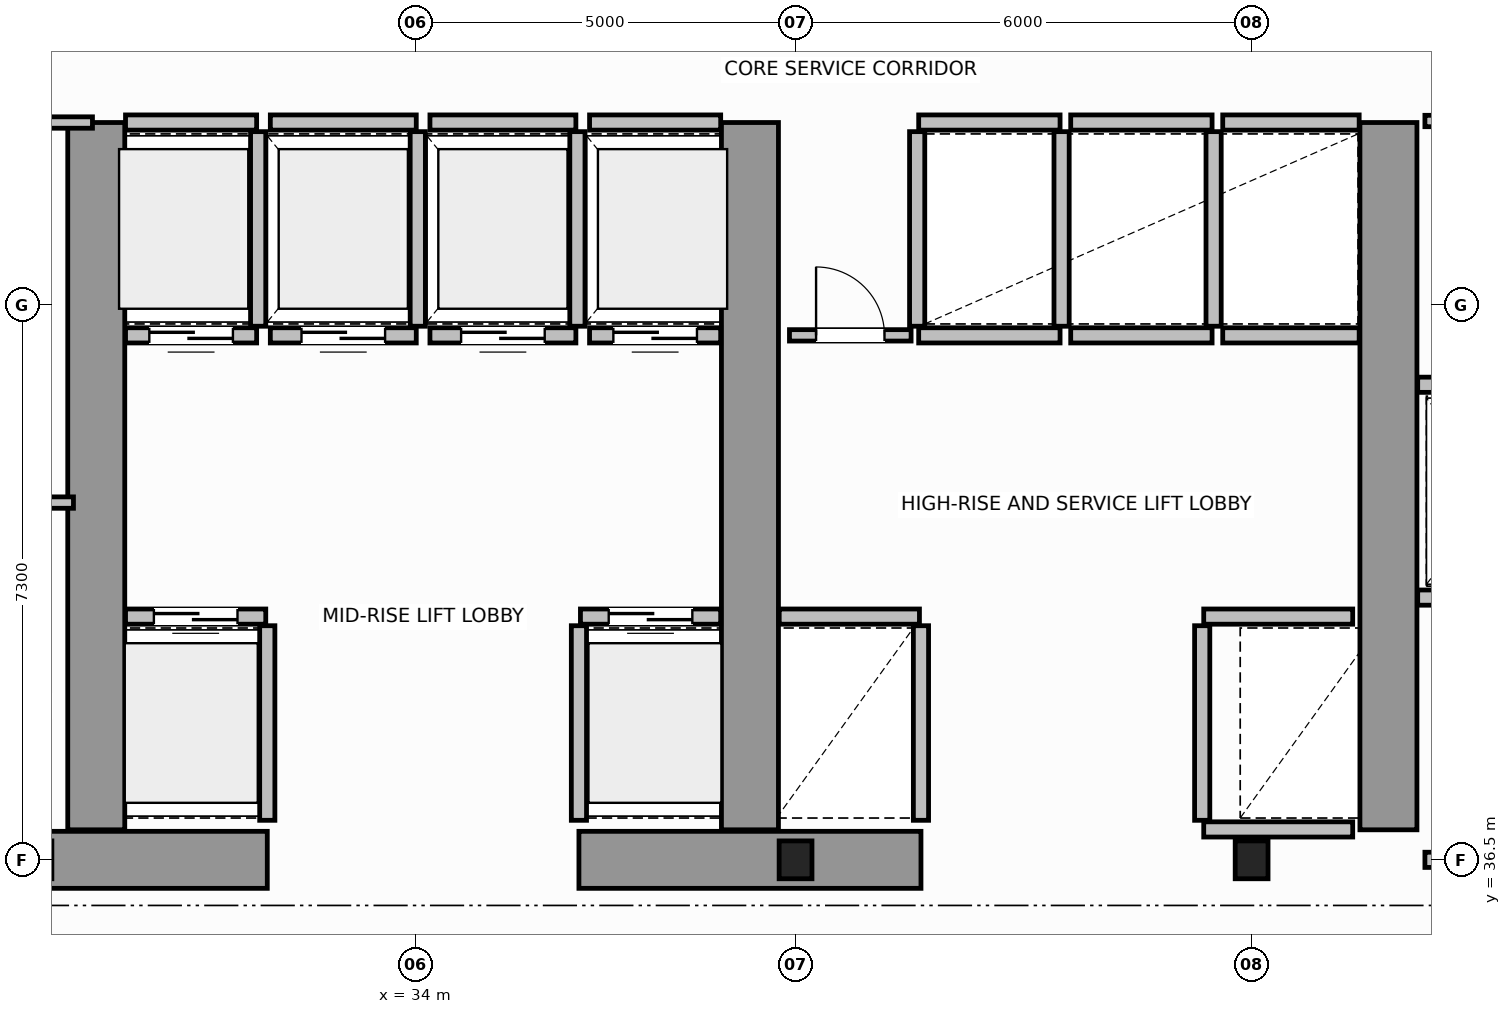
"""IFC4 building model, lengths in metres.
Left out: names, types, materials, properties, quantities, classifications, styles, units other than length and angle.
Written with IfcOpenShell. Run it as: python <this file> out.ifc"""

import sys

from ifc_helpers import new_model, si_unit, direction, frame, frame_2d, origin, origin_2d, place, context, subcontext, project, spatial, rectangle, i_section, extrude, source, transform, mapped, element, fill, save


model = new_model("IFC4")
c1 = context("Model", 3, precision=1e-05, world=origin(), true_north=direction((0.0, 1.0)))
c2 = subcontext(c1, "Body", "Model", "MODEL_VIEW")
j1 = project(units=[si_unit("LENGTHUNIT", "METRE"), si_unit("PLANEANGLEUNIT", "RADIAN")], contexts=[c1])
p1 = place(None, origin())
s1 = spatial("IfcSite", under=j1, at=p1, CompositionType="ELEMENT")
p2 = place(p1, origin())
s2 = spatial("IfcBuilding", under=s1, at=p2, CompositionType="ELEMENT")
p3 = place(p2, frame((0.0, 0.0, 161.4)))
s3 = spatial("IfcBuildingStorey", under=s2, at=p3, CompositionType="ELEMENT", Elevation=161.4)
m1 = source(origin(), c2, "Body", "SweptSolid", [
    extrude(i_section(OverallWidth=0.432, OverallDepth=0.498, WebThickness=0.055, FlangeThickness=0.068, FilletRadius=0.015, at=origin_2d()), origin(), (0.0, 0.0, 1.0), 3.8),
])
for number, where, z_axis, x_axis in (
    (1, (39.0, 36.5, 0.0), (0.0, 0.0, 1.0), (1.0, 0.0, 0.0)),
    (2, (45.0, 36.5, 0.0), (0.0, 0.0, 1.0), (1.0, 0.0, 0.0)),
):
    element("IfcColumn", number, at=place(p3, frame(where, z_axis=z_axis, x_axis=x_axis)), inside=s3, PredefinedType="COLUMN", context=c2, shape_type="MappedRepresentation", body=[
        mapped(m1, transform((0.0, 0.0, 0.0), scale=1.0)),
    ])
for number, where, z_axis, x_axis in (
    (3, (27.55, 36.5, 0.0), (0.0, 0.0, 1.0), (1.0, 0.0, 0.0)),
    (4, (36.15, 36.5, 0.0), (0.0, 0.0, 1.0), (1.0, 0.0, 0.0)),
):
    element("IfcWall", number, at=place(p3, frame(where, z_axis=z_axis, x_axis=x_axis)), inside=s3, PredefinedType="SHEAR", context=c2, shape_type="SweptSolid", body=[
        extrude(rectangle(XDim=4.5, YDim=0.75, at=frame_2d((2.25, 0.0))), origin(), (0.0, 0.0, 1.0), 3.8),
    ])
for number, where, z_axis, x_axis in (
    (5, (29.8, 36.895, 0.0), (0.0, 0.0, 1.0), (0.0, 1.0, 0.0)),
    (6, (38.4, 36.895, 0.0), (0.0, 0.0, 1.0), (0.0, 1.0, 0.0)),
    (7, (46.8, 36.895, 0.0), (0.0, 0.0, 1.0), (0.0, 1.0, 0.0)),
):
    element("IfcWall", number, at=place(p3, frame(where, z_axis=z_axis, x_axis=x_axis)), inside=s3, PredefinedType="SHEAR", context=c2, shape_type="SweptSolid", body=[
        extrude(rectangle(XDim=9.305, YDim=0.75, at=frame_2d((4.652, 0.0))), origin(), (0.0, 0.0, 1.0), 3.8),
    ])
p4 = place(p3, frame((47.28, 36.5, 0.0), z_axis=(0.0, 0.0, 1.0), x_axis=(1.0, 0.0, 0.0)))
e8 = element("IfcWall", 8, at=p4, inside=s3, PredefinedType="SOLIDWALL", context=c2, shape_type="SweptSolid", body=[
    extrude(rectangle(XDim=2.47, YDim=0.2, at=frame_2d((1.235, 0.0))), origin(), (0.0, 0.0, 1.0), 2.37),
])
p5 = place(p4, frame((0.65, 0.0, 0.0)))
e9 = element("IfcOpeningElement", 9, at=p5, cuts=e8, PredefinedType="OPENING", context=c2, shape_type="SweptSolid", body=[
    extrude(rectangle(XDim=1.1, YDim=2.15, at=frame_2d((0.55, 1.075))), frame((0.0, 0.11, 0.0), z_axis=(0.0, -1.0, 0.0), x_axis=(1.0, 0.0, 0.0)), (0.0, 0.0, 1.0), 0.22),
])
p6 = place(p3, frame((30.185, 39.7, 0.0), z_axis=(0.0, 0.0, 1.0), x_axis=(1.0, 0.0, 0.0)))
e10 = element("IfcWall", 10, at=p6, inside=s3, PredefinedType="SOLIDWALL", context=c2, shape_type="SweptSolid", body=[
    extrude(rectangle(XDim=1.845, YDim=0.2, at=frame_2d((0.922, 0.0))), origin(), (0.0, 0.0, 1.0), 3.58),
])
p7 = place(p6, frame((0.373, 0.0, 0.0)))
e11 = element("IfcOpeningElement", 11, at=p7, cuts=e10, PredefinedType="OPENING", context=c2, shape_type="SweptSolid", body=[
    extrude(rectangle(XDim=1.1, YDim=2.15, at=frame_2d((0.55, 1.075))), frame((0.0, 0.11, 0.0), z_axis=(0.0, -1.0, 0.0), x_axis=(1.0, 0.0, 0.0)), (0.0, 0.0, 1.0), 0.22),
])
p8 = place(p3, frame((32.05, 37.02, 0.0), z_axis=(0.0, 0.0, 1.0), x_axis=(0.0, 1.0, 0.0)))
e12 = element("IfcWall", 12, at=p8, inside=s3, PredefinedType="SOLIDWALL", context=c2, shape_type="SweptSolid", body=[
    extrude(rectangle(XDim=2.56, YDim=0.2, at=frame_2d((1.28, 0.0))), origin(), (0.0, 0.0, 1.0), 3.58),
])
p9 = place(p3, frame((36.17, 39.7, 0.0), z_axis=(0.0, 0.0, 1.0), x_axis=(1.0, 0.0, 0.0)))
e13 = element("IfcWall", 13, at=p9, inside=s3, PredefinedType="SOLIDWALL", context=c2, shape_type="SweptSolid", body=[
    extrude(rectangle(XDim=1.845, YDim=0.2, at=frame_2d((0.922, 0.0))), origin(), (0.0, 0.0, 1.0), 3.58),
])
p10 = place(p9, frame((0.372, 0.0, 0.0)))
e14 = element("IfcOpeningElement", 14, at=p10, cuts=e13, PredefinedType="OPENING", context=c2, shape_type="SweptSolid", body=[
    extrude(rectangle(XDim=1.1, YDim=2.15, at=frame_2d((0.55, 1.075))), frame((0.0, 0.11, 0.0), z_axis=(0.0, -1.0, 0.0), x_axis=(1.0, 0.0, 0.0)), (0.0, 0.0, 1.0), 0.22),
])
p11 = place(p3, frame((36.15, 37.02, 0.0), z_axis=(0.0, 0.0, 1.0), x_axis=(0.0, 1.0, 0.0)))
e15 = element("IfcWall", 15, at=p11, inside=s3, PredefinedType="SOLIDWALL", context=c2, shape_type="SweptSolid", body=[
    extrude(rectangle(XDim=2.56, YDim=0.2, at=frame_2d((1.28, 0.0))), origin(), (0.0, 0.0, 1.0), 3.58),
])
p12 = place(p3, frame((30.185, 43.4, 0.0), z_axis=(0.0, 0.0, 1.0), x_axis=(1.0, 0.0, 0.0)))
e16 = element("IfcWall", 16, at=p12, inside=s3, PredefinedType="SOLIDWALL", context=c2, shape_type="SweptSolid", body=[
    extrude(rectangle(XDim=1.725, YDim=0.2, at=frame_2d((0.862, 0.0))), origin(), (0.0, 0.0, 1.0), 3.58),
])
p13 = place(p12, frame((0.313, 0.0, 0.0)))
e17 = element("IfcOpeningElement", 17, at=p13, cuts=e16, PredefinedType="OPENING", context=c2, shape_type="SweptSolid", body=[
    extrude(rectangle(XDim=1.1, YDim=2.15, at=frame_2d((0.55, 1.075))), frame((0.0, 0.11, 0.0), z_axis=(0.0, -1.0, 0.0), x_axis=(1.0, 0.0, 0.0)), (0.0, 0.0, 1.0), 0.22),
])
p14 = place(p3, frame((30.185, 46.2, 0.0), z_axis=(0.0, 0.0, 1.0), x_axis=(1.0, 0.0, 0.0)))
e18 = element("IfcWall", 18, at=p14, inside=s3, PredefinedType="SOLIDWALL", context=c2, shape_type="SweptSolid", body=[
    extrude(rectangle(XDim=1.725, YDim=0.2, at=frame_2d((0.862, 0.0))), origin(), (0.0, 0.0, 1.0), 3.58),
])
p15 = place(p3, frame((31.93, 43.52, 0.0), z_axis=(0.0, 0.0, 1.0), x_axis=(0.0, 1.0, 0.0)))
e19 = element("IfcWall", 19, at=p15, inside=s3, PredefinedType="SOLIDWALL", context=c2, shape_type="SweptSolid", body=[
    extrude(rectangle(XDim=2.56, YDim=0.2, at=frame_2d((1.28, 0.0))), origin(), (0.0, 0.0, 1.0), 3.58),
])
p16 = place(p3, frame((32.09, 43.4, 0.0), z_axis=(0.0, 0.0, 1.0), x_axis=(1.0, 0.0, 0.0)))
e20 = element("IfcWall", 20, at=p16, inside=s3, PredefinedType="SOLIDWALL", context=c2, shape_type="SweptSolid", body=[
    extrude(rectangle(XDim=1.92, YDim=0.2, at=frame_2d((0.96, 0.0))), origin(), (0.0, 0.0, 1.0), 3.58),
])
p17 = place(p16, frame((0.41, 0.0, 0.0)))
e21 = element("IfcOpeningElement", 21, at=p17, cuts=e20, PredefinedType="OPENING", context=c2, shape_type="SweptSolid", body=[
    extrude(rectangle(XDim=1.1, YDim=2.15, at=frame_2d((0.55, 1.075))), frame((0.0, 0.11, 0.0), z_axis=(0.0, -1.0, 0.0), x_axis=(1.0, 0.0, 0.0)), (0.0, 0.0, 1.0), 0.22),
])
p18 = place(p3, frame((32.09, 46.2, 0.0), z_axis=(0.0, 0.0, 1.0), x_axis=(1.0, 0.0, 0.0)))
e22 = element("IfcWall", 22, at=p18, inside=s3, PredefinedType="SOLIDWALL", context=c2, shape_type="SweptSolid", body=[
    extrude(rectangle(XDim=1.92, YDim=0.2, at=frame_2d((0.96, 0.0))), origin(), (0.0, 0.0, 1.0), 3.58),
])
p19 = place(p3, frame((34.03, 43.52, 0.0), z_axis=(0.0, 0.0, 1.0), x_axis=(0.0, 1.0, 0.0)))
e23 = element("IfcWall", 23, at=p19, inside=s3, PredefinedType="SOLIDWALL", context=c2, shape_type="SweptSolid", body=[
    extrude(rectangle(XDim=2.56, YDim=0.2, at=frame_2d((1.28, 0.0))), origin(), (0.0, 0.0, 1.0), 3.58),
])
p20 = place(p3, frame((34.19, 43.4, 0.0), z_axis=(0.0, 0.0, 1.0), x_axis=(1.0, 0.0, 0.0)))
e24 = element("IfcWall", 24, at=p20, inside=s3, PredefinedType="SOLIDWALL", context=c2, shape_type="SweptSolid", body=[
    extrude(rectangle(XDim=1.92, YDim=0.2, at=frame_2d((0.96, 0.0))), origin(), (0.0, 0.0, 1.0), 3.58),
])
p21 = place(p20, frame((0.41, 0.0, 0.0)))
e25 = element("IfcOpeningElement", 25, at=p21, cuts=e24, PredefinedType="OPENING", context=c2, shape_type="SweptSolid", body=[
    extrude(rectangle(XDim=1.1, YDim=2.15, at=frame_2d((0.55, 1.075))), frame((0.0, 0.11, 0.0), z_axis=(0.0, -1.0, 0.0), x_axis=(1.0, 0.0, 0.0)), (0.0, 0.0, 1.0), 0.22),
])
p22 = place(p3, frame((34.19, 46.2, 0.0), z_axis=(0.0, 0.0, 1.0), x_axis=(1.0, 0.0, 0.0)))
e26 = element("IfcWall", 26, at=p22, inside=s3, PredefinedType="SOLIDWALL", context=c2, shape_type="SweptSolid", body=[
    extrude(rectangle(XDim=1.92, YDim=0.2, at=frame_2d((0.96, 0.0))), origin(), (0.0, 0.0, 1.0), 3.58),
])
p23 = place(p3, frame((36.13, 43.52, 0.0), z_axis=(0.0, 0.0, 1.0), x_axis=(0.0, 1.0, 0.0)))
e27 = element("IfcWall", 27, at=p23, inside=s3, PredefinedType="SOLIDWALL", context=c2, shape_type="SweptSolid", body=[
    extrude(rectangle(XDim=2.56, YDim=0.2, at=frame_2d((1.28, 0.0))), origin(), (0.0, 0.0, 1.0), 3.58),
])
p24 = place(p3, frame((36.29, 43.4, 0.0), z_axis=(0.0, 0.0, 1.0), x_axis=(1.0, 0.0, 0.0)))
e28 = element("IfcWall", 28, at=p24, inside=s3, PredefinedType="SOLIDWALL", context=c2, shape_type="SweptSolid", body=[
    extrude(rectangle(XDim=1.725, YDim=0.2, at=frame_2d((0.862, 0.0))), origin(), (0.0, 0.0, 1.0), 3.58),
])
p25 = place(p24, frame((0.313, 0.0, 0.0)))
e29 = element("IfcOpeningElement", 29, at=p25, cuts=e28, PredefinedType="OPENING", context=c2, shape_type="SweptSolid", body=[
    extrude(rectangle(XDim=1.1, YDim=2.15, at=frame_2d((0.55, 1.075))), frame((0.0, 0.11, 0.0), z_axis=(0.0, -1.0, 0.0), x_axis=(1.0, 0.0, 0.0)), (0.0, 0.0, 1.0), 0.22),
])
p26 = place(p3, frame((36.29, 46.2, 0.0), z_axis=(0.0, 0.0, 1.0), x_axis=(1.0, 0.0, 0.0)))
e30 = element("IfcWall", 30, at=p26, inside=s3, PredefinedType="SOLIDWALL", context=c2, shape_type="SweptSolid", body=[
    extrude(rectangle(XDim=1.725, YDim=0.2, at=frame_2d((0.862, 0.0))), origin(), (0.0, 0.0, 1.0), 3.58),
])
p27 = place(p3, frame((38.785, 39.7, 0.0), z_axis=(0.0, 0.0, 1.0), x_axis=(1.0, 0.0, 0.0)))
e31 = element("IfcWall", 31, at=p27, inside=s3, PredefinedType="SOLIDWALL", context=c2, shape_type="SweptSolid", body=[
    extrude(rectangle(XDim=1.845, YDim=0.2, at=frame_2d((0.922, 0.0))), origin(), (0.0, 0.0, 1.0), 3.58),
])
p28 = place(p3, frame((40.65, 37.02, 0.0), z_axis=(0.0, 0.0, 1.0), x_axis=(0.0, 1.0, 0.0)))
e32 = element("IfcWall", 32, at=p28, inside=s3, PredefinedType="SOLIDWALL", context=c2, shape_type="SweptSolid", body=[
    extrude(rectangle(XDim=2.56, YDim=0.2, at=frame_2d((1.28, 0.0))), origin(), (0.0, 0.0, 1.0), 3.58),
])
p29 = place(p3, frame((44.37, 39.7, 0.0), z_axis=(0.0, 0.0, 1.0), x_axis=(1.0, 0.0, 0.0)))
e33 = element("IfcWall", 33, at=p29, inside=s3, PredefinedType="SOLIDWALL", context=c2, shape_type="SweptSolid", body=[
    extrude(rectangle(XDim=1.96, YDim=0.2, at=frame_2d((0.98, 0.0))), origin(), (0.0, 0.0, 1.0), 3.58),
])
p30 = place(p3, frame((44.37, 36.9, 0.0), z_axis=(0.0, 0.0, 1.0), x_axis=(1.0, 0.0, 0.0)))
e34 = element("IfcWall", 34, at=p30, inside=s3, PredefinedType="SOLIDWALL", context=c2, shape_type="SweptSolid", body=[
    extrude(rectangle(XDim=1.96, YDim=0.2, at=frame_2d((0.98, 0.0))), origin(), (0.0, 0.0, 1.0), 2.37),
])
p31 = place(p3, frame((44.35, 37.02, 0.0), z_axis=(0.0, 0.0, 1.0), x_axis=(0.0, 1.0, 0.0)))
e35 = element("IfcWall", 35, at=p31, inside=s3, PredefinedType="SOLIDWALL", context=c2, shape_type="SweptSolid", body=[
    extrude(rectangle(XDim=2.56, YDim=0.2, at=frame_2d((1.28, 0.0))), origin(), (0.0, 0.0, 1.0), 3.58),
])
for number, where, z_axis, x_axis in (
    (36, (40.62, 43.4, 0.0), (0.0, 0.0, 1.0), (1.0, 0.0, 0.0)),
    (37, (40.62, 46.2, 0.0), (0.0, 0.0, 1.0), (1.0, 0.0, 0.0)),
):
    element("IfcWall", number, at=place(p3, frame(where, z_axis=z_axis, x_axis=x_axis)), inside=s3, PredefinedType="SOLIDWALL", context=c2, shape_type="SweptSolid", body=[
        extrude(rectangle(XDim=1.86, YDim=0.2, at=frame_2d((0.93, 0.0))), origin(), (0.0, 0.0, 1.0), 3.58),
    ])
for number, where, z_axis, x_axis in (
    (38, (40.6, 43.52, 0.0), (0.0, 0.0, 1.0), (0.0, 1.0, 0.0)),
    (39, (42.5, 43.52, 0.0), (0.0, 0.0, 1.0), (0.0, 1.0, 0.0)),
):
    element("IfcWall", number, at=place(p3, frame(where, z_axis=z_axis, x_axis=x_axis)), inside=s3, PredefinedType="SOLIDWALL", context=c2, shape_type="SweptSolid", body=[
        extrude(rectangle(XDim=2.56, YDim=0.2, at=frame_2d((1.28, 0.0))), origin(), (0.0, 0.0, 1.0), 3.58),
    ])
for number, where, z_axis, x_axis in (
    (40, (42.62, 43.4, 0.0), (0.0, 0.0, 1.0), (1.0, 0.0, 0.0)),
    (41, (42.62, 46.2, 0.0), (0.0, 0.0, 1.0), (1.0, 0.0, 0.0)),
):
    element("IfcWall", number, at=place(p3, frame(where, z_axis=z_axis, x_axis=x_axis)), inside=s3, PredefinedType="SOLIDWALL", context=c2, shape_type="SweptSolid", body=[
        extrude(rectangle(XDim=1.86, YDim=0.2, at=frame_2d((0.93, 0.0))), origin(), (0.0, 0.0, 1.0), 3.58),
    ])
p32 = place(p3, frame((44.5, 43.52, 0.0), z_axis=(0.0, 0.0, 1.0), x_axis=(0.0, 1.0, 0.0)))
e42 = element("IfcWall", 42, at=p32, inside=s3, PredefinedType="SOLIDWALL", context=c2, shape_type="SweptSolid", body=[
    extrude(rectangle(XDim=2.56, YDim=0.2, at=frame_2d((1.28, 0.0))), origin(), (0.0, 0.0, 1.0), 3.58),
])
for number, where, z_axis, x_axis in (
    (43, (44.62, 43.4, 0.0), (0.0, 0.0, 1.0), (1.0, 0.0, 0.0)),
    (44, (44.62, 46.2, 0.0), (0.0, 0.0, 1.0), (1.0, 0.0, 0.0)),
):
    element("IfcWall", number, at=place(p3, frame(where, z_axis=z_axis, x_axis=x_axis)), inside=s3, PredefinedType="SOLIDWALL", context=c2, shape_type="SweptSolid", body=[
        extrude(rectangle(XDim=1.795, YDim=0.2, at=frame_2d((0.897, 0.0))), origin(), (0.0, 0.0, 1.0), 3.58),
    ])
p33 = place(p3, frame((47.185, 39.95, 0.0), z_axis=(0.0, 0.0, 1.0), x_axis=(1.0, 0.0, 0.0)))
e45 = element("IfcWall", 45, at=p33, inside=s3, PredefinedType="SOLIDWALL", context=c2, shape_type="SweptSolid", body=[
    extrude(rectangle(XDim=2.145, YDim=0.2, at=frame_2d((1.073, 0.0))), origin(), (0.0, 0.0, 1.0), 3.58),
])
p34 = place(p33, frame((0.522, 0.0, 0.0)))
e46 = element("IfcOpeningElement", 46, at=p34, cuts=e45, PredefinedType="OPENING", context=c2, shape_type="SweptSolid", body=[
    extrude(rectangle(XDim=1.1, YDim=2.15, at=frame_2d((0.55, 1.075))), frame((0.0, 0.11, 0.0), z_axis=(0.0, -1.0, 0.0), x_axis=(1.0, 0.0, 0.0)), (0.0, 0.0, 1.0), 0.22),
])
p35 = place(p3, frame((47.185, 42.75, 0.0), z_axis=(0.0, 0.0, 1.0), x_axis=(1.0, 0.0, 0.0)))
e47 = element("IfcWall", 47, at=p35, inside=s3, PredefinedType="SOLIDWALL", context=c2, shape_type="SweptSolid", body=[
    extrude(rectangle(XDim=2.145, YDim=0.2, at=frame_2d((1.073, 0.0))), origin(), (0.0, 0.0, 1.0), 3.58),
])
p36 = place(p3, frame((21.25, 46.2, 0.0), z_axis=(0.0, 0.0, 1.0), x_axis=(1.0, 0.0, 0.0)))
e48 = element("IfcWall", 48, at=p36, inside=s3, PredefinedType="PARTITIONING", context=c2, shape_type="SweptSolid", body=[
    extrude(rectangle(XDim=8.5, YDim=0.15, at=frame_2d((4.25, 0.0))), origin(), (0.0, 0.0, 1.0), 3.58),
])
p37 = place(p3, frame((21.5, 41.2, 0.0), z_axis=(0.0, 0.0, 1.0), x_axis=(1.0, 0.0, 0.0)))
e49 = element("IfcWall", 49, at=p37, inside=s3, PredefinedType="PARTITIONING", context=c2, shape_type="SweptSolid", body=[
    extrude(rectangle(XDim=8.0, YDim=0.15, at=frame_2d((4.0, 0.0))), origin(), (0.0, 0.0, 1.0), 3.58),
])
p38 = place(p37, frame((3.4, 0.0, 0.0)))
e50 = element("IfcOpeningElement", 50, at=p38, cuts=e49, PredefinedType="OPENING", context=c2, shape_type="SweptSolid", body=[
    extrude(rectangle(XDim=0.9, YDim=2.1, at=frame_2d((0.45, 1.05))), frame((0.0, 0.085, 0.0), z_axis=(0.0, -1.0, 0.0), x_axis=(1.0, 0.0, 0.0)), (0.0, 0.0, 1.0), 0.17),
])
p39 = place(p3, frame((47.28, 46.22, 0.0), z_axis=(0.0, 0.0, 1.0), x_axis=(1.0, 0.0, 0.0)))
e51 = element("IfcWall", 51, at=p39, inside=s3, PredefinedType="PARTITIONING", context=c2, shape_type="SweptSolid", body=[
    extrude(rectangle(XDim=2.1, YDim=0.15, at=frame_2d((1.05, 0.0))), origin(), (0.0, 0.0, 1.0), 3.58),
])
p40 = place(p39, frame((0.55, 0.0, 0.0)))
e52 = element("IfcOpeningElement", 52, at=p40, cuts=e51, PredefinedType="OPENING", context=c2, shape_type="SweptSolid", body=[
    extrude(rectangle(XDim=0.9, YDim=2.1, at=frame_2d((0.45, 1.05))), frame((0.0, 0.085, 0.0), z_axis=(0.0, -1.0, 0.0), x_axis=(1.0, 0.0, 0.0)), (0.0, 0.0, 1.0), 0.17),
])
p41 = place(p3, frame((38.92, 43.4, 0.0), z_axis=(0.0, 0.0, 1.0), x_axis=(1.0, 0.0, 0.0)))
e53 = element("IfcWall", 53, at=p41, inside=s3, PredefinedType="PARTITIONING", context=c2, shape_type="SweptSolid", body=[
    extrude(rectangle(XDim=1.6, YDim=0.15, at=frame_2d((0.8, 0.0))), origin(), (0.0, 0.0, 1.0), 3.58),
])
p42 = place(p41, frame((0.35, 0.0, 0.0)))
e54 = element("IfcOpeningElement", 54, at=p42, cuts=e53, PredefinedType="OPENING", context=c2, shape_type="SweptSolid", body=[
    extrude(rectangle(XDim=0.9, YDim=2.1, at=frame_2d((0.45, 1.05))), frame((0.0, 0.085, 0.0), z_axis=(0.0, -1.0, 0.0), x_axis=(1.0, 0.0, 0.0)), (0.0, 0.0, 1.0), 0.17),
])
m2 = source(origin(), c2, "Body", "SweptSolid", [
    extrude(rectangle(XDim=1.1, YDim=2.15, at=frame_2d((0.55, 1.075))), frame((0.0, 0.025, 0.0), z_axis=(0.0, -1.0, 0.0), x_axis=(1.0, 0.0, 0.0)), (0.0, 0.0, 1.0), 0.05),
])
p43 = place(p7, origin())
e55 = element("IfcDoor", 55, at=p43, inside=s3, OperationType="DOUBLE_DOOR_SLIDING", PredefinedType="DOOR", context=c2, shape_type="MappedRepresentation", body=[
    mapped(m2, transform((0.0, 0.0, 0.0), scale=1.0)),
])
fill(e11, e55)
p44 = place(p10, origin())
e56 = element("IfcDoor", 56, at=p44, inside=s3, OperationType="DOUBLE_DOOR_SLIDING", PredefinedType="DOOR", context=c2, shape_type="MappedRepresentation", body=[
    mapped(m2, transform((0.0, 0.0, 0.0), scale=1.0)),
])
fill(e14, e56)
p45 = place(p13, origin())
e57 = element("IfcDoor", 57, at=p45, inside=s3, OperationType="DOUBLE_DOOR_SLIDING", PredefinedType="DOOR", context=c2, shape_type="MappedRepresentation", body=[
    mapped(m2, transform((0.0, 0.0, 0.0), scale=1.0)),
])
fill(e17, e57)
p46 = place(p17, origin())
e58 = element("IfcDoor", 58, at=p46, inside=s3, OperationType="DOUBLE_DOOR_SLIDING", PredefinedType="DOOR", context=c2, shape_type="MappedRepresentation", body=[
    mapped(m2, transform((0.0, 0.0, 0.0), scale=1.0)),
])
fill(e21, e58)
p47 = place(p21, origin())
e59 = element("IfcDoor", 59, at=p47, inside=s3, OperationType="DOUBLE_DOOR_SLIDING", PredefinedType="DOOR", context=c2, shape_type="MappedRepresentation", body=[
    mapped(m2, transform((0.0, 0.0, 0.0), scale=1.0)),
])
fill(e25, e59)
p48 = place(p25, origin())
e60 = element("IfcDoor", 60, at=p48, inside=s3, OperationType="DOUBLE_DOOR_SLIDING", PredefinedType="DOOR", context=c2, shape_type="MappedRepresentation", body=[
    mapped(m2, transform((0.0, 0.0, 0.0), scale=1.0)),
])
fill(e29, e60)
m3 = source(origin(), c2, "Body", "SweptSolid", [
    extrude(rectangle(XDim=0.9, YDim=2.1, at=frame_2d((0.45, 1.05))), frame((0.0, 0.025, 0.0), z_axis=(0.0, -1.0, 0.0), x_axis=(1.0, 0.0, 0.0)), (0.0, 0.0, 1.0), 0.05),
])
p49 = place(p42, origin())
e61 = element("IfcDoor", 61, at=p49, inside=s3, OperationType="SINGLE_SWING_LEFT", PredefinedType="DOOR", context=c2, shape_type="MappedRepresentation", body=[
    mapped(m3, transform((0.0, 0.0, 0.0), scale=1.0)),
])
fill(e54, e61)
save(model, sys.argv[1])
